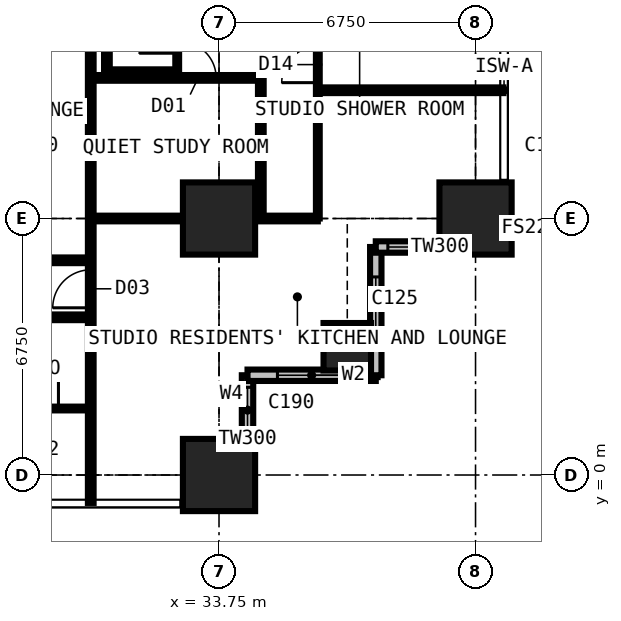
"""IFC4 building model, lengths in metres.
Left out: names, types, materials, properties, quantities, classifications, styles, units other than length and angle.
Written with IfcOpenShell. Run it as: python <this file> out.ifc"""

import sys

from ifc_helpers import new_model, si_unit, direction, frame, frame_2d, origin, origin_2d, place, context, subcontext, project, spatial, rectangle, extrude, element, fill, save


model = new_model("IFC4")
c1 = context("Model", 3, precision=1e-05, world=origin(), true_north=direction((0.0, 1.0)))
c2 = subcontext(c1, "Body", "Model", "MODEL_VIEW")
j1 = project(units=[si_unit("LENGTHUNIT", "METRE"), si_unit("PLANEANGLEUNIT", "RADIAN")], contexts=[c1])
p1 = place(None, origin())
s1 = spatial("IfcSite", under=j1, at=p1, CompositionType="ELEMENT")
p2 = place(p1, origin())
s2 = spatial("IfcBuilding", under=s1, at=p2, CompositionType="ELEMENT")
p3 = place(p2, frame((0.0, 0.0, 25.2)))
s3 = spatial("IfcBuildingStorey", under=s2, at=p3, CompositionType="ELEMENT", Elevation=25.2)
for number, where, z_axis, x_axis in (
    (1, (33.75, 0.0, 0.0), (0.0, 0.0, 1.0), (1.0, 0.0, 0.0)),
    (2, (33.75, 6.75, 0.0), (0.0, 0.0, 1.0), (1.0, 0.0, 0.0)),
):
    element("IfcColumn", number, at=place(p3, frame(where, z_axis=z_axis, x_axis=x_axis)), inside=s3, PredefinedType="COLUMN", context=c2, shape_type="SweptSolid", body=[
        extrude(rectangle(XDim=1.9, YDim=1.9, at=origin_2d()), origin(), (0.0, 0.0, 1.0), 3.6),
    ])
p4 = place(p3, frame((37.125, 3.375, 0.0), z_axis=(0.0, 0.0, 1.0), x_axis=(1.0, 0.0, 0.0)))
e3 = element("IfcColumn", 3, at=p4, inside=s3, PredefinedType="COLUMN", context=c2, shape_type="SweptSolid", body=[
    extrude(rectangle(XDim=1.25, YDim=1.25, at=origin_2d()), origin(), (0.0, 0.0, 1.0), 3.6),
])
p5 = place(p3, frame((40.5, 6.75, 0.0), z_axis=(0.0, 0.0, 1.0), x_axis=(1.0, 0.0, 0.0)))
e4 = element("IfcColumn", 4, at=p5, inside=s3, PredefinedType="COLUMN", context=c2, shape_type="SweptSolid", body=[
    extrude(rectangle(XDim=1.9, YDim=1.9, at=origin_2d()), origin(), (0.0, 0.0, 1.0), 3.6),
])
p6 = place(p3, frame((34.5, -0.75, 0.0), z_axis=(0.0, 0.0, 1.0), x_axis=(0.0, 1.0, 0.0)))
e5 = element("IfcWall", 5, at=p6, inside=s3, PredefinedType="SOLIDWALL", context=c2, shape_type="SweptSolid", body=[
    extrude(rectangle(XDim=3.375, YDim=0.3, at=frame_2d((1.688, 0.0))), origin(), (0.0, 0.0, 1.0), 3.375),
])
p7 = place(p6, frame((1.857, 0.0, 0.9)))
e6 = element("IfcOpeningElement", 6, at=p7, cuts=e5, PredefinedType="OPENING", context=c2, shape_type="SweptSolid", body=[
    extrude(rectangle(XDim=1.2, YDim=1.8, at=frame_2d((0.6, 0.9))), frame((0.0, 0.16, 0.0), z_axis=(0.0, -1.0, 0.0), x_axis=(1.0, 0.0, 0.0)), (0.0, 0.0, 1.0), 0.32),
])
p8 = place(p3, frame((34.5, 2.625, 0.0), z_axis=(0.0, 0.0, 1.0), x_axis=(1.0, 0.0, 0.0)))
e7 = element("IfcWall", 7, at=p8, inside=s3, PredefinedType="SOLIDWALL", context=c2, shape_type="SweptSolid", body=[
    extrude(rectangle(XDim=3.375, YDim=0.3, at=frame_2d((1.688, 0.0))), origin(), (0.0, 0.0, 1.0), 3.375),
])
p9 = place(p8, frame((0.788, 0.0, 0.6)))
e8 = element("IfcOpeningElement", 8, at=p9, cuts=e7, PredefinedType="OPENING", context=c2, shape_type="SweptSolid", body=[
    extrude(rectangle(XDim=1.8, YDim=2.1, at=frame_2d((0.9, 1.05))), frame((0.0, 0.16, 0.0), z_axis=(0.0, -1.0, 0.0), x_axis=(1.0, 0.0, 0.0)), (0.0, 0.0, 1.0), 0.32),
])
p10 = place(p3, frame((37.875, 2.625, 0.0), z_axis=(0.0, 0.0, 1.0), x_axis=(0.0, 1.0, 0.0)))
e9 = element("IfcWall", 9, at=p10, inside=s3, PredefinedType="SOLIDWALL", context=c2, shape_type="SweptSolid", body=[
    extrude(rectangle(XDim=3.375, YDim=0.3, at=frame_2d((1.688, 0.0))), origin(), (0.0, 0.0, 1.0), 3.375),
])
p11 = place(p10, frame((0.788, 0.0, 0.6)))
e10 = element("IfcOpeningElement", 10, at=p11, cuts=e9, PredefinedType="OPENING", context=c2, shape_type="SweptSolid", body=[
    extrude(rectangle(XDim=1.8, YDim=2.1, at=frame_2d((0.9, 1.05))), frame((0.0, 0.16, 0.0), z_axis=(0.0, -1.0, 0.0), x_axis=(1.0, 0.0, 0.0)), (0.0, 0.0, 1.0), 0.32),
])
p12 = place(p3, frame((37.875, 6.0, 0.0), z_axis=(0.0, 0.0, 1.0), x_axis=(1.0, 0.0, 0.0)))
e11 = element("IfcWall", 11, at=p12, inside=s3, PredefinedType="SOLIDWALL", context=c2, shape_type="SweptSolid", body=[
    extrude(rectangle(XDim=3.375, YDim=0.3, at=frame_2d((1.688, 0.0))), origin(), (0.0, 0.0, 1.0), 3.375),
])
p13 = place(p12, frame((0.317, 0.0, 0.9)))
e12 = element("IfcOpeningElement", 12, at=p13, cuts=e11, PredefinedType="OPENING", context=c2, shape_type="SweptSolid", body=[
    extrude(rectangle(XDim=1.2, YDim=1.8, at=frame_2d((0.6, 0.9))), frame((0.0, 0.16, 0.0), z_axis=(0.0, -1.0, 0.0), x_axis=(1.0, 0.0, 0.0)), (0.0, 0.0, 1.0), 0.32),
])
p14 = place(p3, frame((6.75, 4.15, 0.0), z_axis=(0.0, 0.0, 1.0), x_axis=(1.0, 0.0, 0.0)))
e13 = element("IfcWall", 13, at=p14, inside=s3, PredefinedType="PARTITIONING", context=c2, shape_type="SweptSolid", body=[
    extrude(rectangle(XDim=23.625, YDim=0.15, at=frame_2d((11.812, 0.0))), origin(), (0.0, 0.0, 1.0), 3.375),
])
p15 = place(p14, frame((0.2, 0.0, 0.0)))
e14 = element("IfcOpeningElement", 14, at=p15, cuts=e13, PredefinedType="OPENING", context=c2, shape_type="SweptSolid", body=[
    extrude(rectangle(XDim=0.95, YDim=2.2, at=frame_2d((0.475, 1.1))), frame((0.0, 0.085, 0.0), z_axis=(0.0, -1.0, 0.0), x_axis=(1.0, 0.0, 0.0)), (0.0, 0.0, 1.0), 0.17),
])
p16 = place(p14, frame((3.625, 0.0, 0.0)))
e15 = element("IfcOpeningElement", 15, at=p16, cuts=e13, PredefinedType="OPENING", context=c2, shape_type="SweptSolid", body=[
    extrude(rectangle(XDim=0.95, YDim=2.2, at=frame_2d((0.475, 1.1))), frame((0.0, 0.085, 0.0), z_axis=(0.0, -1.0, 0.0), x_axis=(1.0, 0.0, 0.0)), (0.0, 0.0, 1.0), 0.17),
])
p17 = place(p14, frame((18.475, 0.0, 0.0)))
e16 = element("IfcOpeningElement", 16, at=p17, cuts=e13, PredefinedType="OPENING", context=c2, shape_type="SweptSolid", body=[
    extrude(rectangle(XDim=0.95, YDim=2.2, at=frame_2d((0.475, 1.1))), frame((0.0, 0.085, 0.0), z_axis=(0.0, -1.0, 0.0), x_axis=(1.0, 0.0, 0.0)), (0.0, 0.0, 1.0), 0.17),
])
p18 = place(p14, frame((11.725, 0.0, 0.0)))
e17 = element("IfcOpeningElement", 17, at=p18, cuts=e13, PredefinedType="OPENING", context=c2, shape_type="SweptSolid", body=[
    extrude(rectangle(XDim=0.95, YDim=2.2, at=frame_2d((0.475, 1.1))), frame((0.0, 0.085, 0.0), z_axis=(0.0, -1.0, 0.0), x_axis=(1.0, 0.0, 0.0)), (0.0, 0.0, 1.0), 0.17),
])
p19 = place(p14, frame((6.95, 0.0, 0.0)))
e18 = element("IfcOpeningElement", 18, at=p19, cuts=e13, PredefinedType="OPENING", context=c2, shape_type="SweptSolid", body=[
    extrude(rectangle(XDim=0.95, YDim=2.2, at=frame_2d((0.475, 1.1))), frame((0.0, 0.085, 0.0), z_axis=(0.0, -1.0, 0.0), x_axis=(1.0, 0.0, 0.0)), (0.0, 0.0, 1.0), 0.17),
])
p20 = place(p3, frame((22.988, 5.65, 0.0), z_axis=(0.0, 0.0, 1.0), x_axis=(1.0, 0.0, 0.0)))
e19 = element("IfcWall", 19, at=p20, inside=s3, PredefinedType="PARTITIONING", context=c2, shape_type="SweptSolid", body=[
    extrude(rectangle(XDim=7.387, YDim=0.15, at=frame_2d((3.694, 0.0))), origin(), (0.0, 0.0, 1.0), 3.375),
])
p21 = place(p20, frame((2.1, 0.0, 0.0)))
e20 = element("IfcOpeningElement", 20, at=p21, cuts=e19, PredefinedType="OPENING", context=c2, shape_type="SweptSolid", body=[
    extrude(rectangle(XDim=0.95, YDim=2.2, at=frame_2d((0.475, 1.1))), frame((0.0, 0.085, 0.0), z_axis=(0.0, -1.0, 0.0), x_axis=(1.0, 0.0, 0.0)), (0.0, 0.0, 1.0), 0.17),
])
p22 = place(p3, frame((27.775, 1.75, 0.0), z_axis=(0.0, 0.0, 1.0), x_axis=(1.0, 0.0, 0.0)))
e21 = element("IfcWall", 21, at=p22, inside=s3, PredefinedType="PARTITIONING", context=c2, shape_type="SweptSolid", body=[
    extrude(rectangle(XDim=2.6, YDim=0.1, at=frame_2d((1.3, 0.0))), origin(), (0.0, 0.0, 1.0), 3.375),
])
p23 = place(p22, frame((0.85, 0.0, 0.0)))
e22 = element("IfcOpeningElement", 22, at=p23, cuts=e21, PredefinedType="OPENING", context=c2, shape_type="SweptSolid", body=[
    extrude(rectangle(XDim=0.9, YDim=2.2, at=frame_2d((0.45, 1.1))), frame((0.0, 0.06, 0.0), z_axis=(0.0, -1.0, 0.0), x_axis=(1.0, 0.0, 0.0)), (0.0, 0.0, 1.0), 0.12),
])
p24 = place(p3, frame((30.375, -0.734, 0.0), z_axis=(0.0, 0.0, 1.0), x_axis=(0.0, 1.0, 0.0)))
e23 = element("IfcWall", 23, at=p24, inside=s3, PredefinedType="PARTITIONING", context=c2, shape_type="SweptSolid", body=[
    extrude(rectangle(XDim=12.034, YDim=0.15, at=frame_2d((6.017, 0.0))), origin(), (0.0, 0.0, 1.0), 3.375),
])
p25 = place(p24, frame((5.134, 0.0, 0.0)))
e24 = element("IfcOpeningElement", 24, at=p25, cuts=e23, PredefinedType="OPENING", context=c2, shape_type="SweptSolid", body=[
    extrude(rectangle(XDim=1.0, YDim=2.2, at=frame_2d((0.5, 1.1))), frame((0.0, 0.085, 0.0), z_axis=(0.0, -1.0, 0.0), x_axis=(1.0, 0.0, 0.0)), (0.0, 0.0, 1.0), 0.17),
])
p26 = place(p3, frame((30.375, 6.75, 0.0), z_axis=(0.0, 0.0, 1.0), x_axis=(1.0, 0.0, 0.0)))
e25 = element("IfcWall", 25, at=p26, inside=s3, PredefinedType="PARTITIONING", context=c2, shape_type="SweptSolid", body=[
    extrude(rectangle(XDim=5.975, YDim=0.15, at=frame_2d((2.988, 0.0))), origin(), (0.0, 0.0, 1.0), 2.877),
])
p27 = place(p3, frame((30.375, 10.45, 0.0), z_axis=(0.0, 0.0, 1.0), x_axis=(1.0, 0.0, 0.0)))
e26 = element("IfcWall", 26, at=p27, inside=s3, PredefinedType="PARTITIONING", context=c2, shape_type="SweptSolid", body=[
    extrude(rectangle(XDim=4.475, YDim=0.15, at=frame_2d((2.238, 0.0))), origin(), (0.0, 0.0, 1.0), 3.375),
])
p28 = place(p27, frame((2.35, 0.0, 0.0)))
e27 = element("IfcOpeningElement", 27, at=p28, cuts=e26, PredefinedType="OPENING", context=c2, shape_type="SweptSolid", body=[
    extrude(rectangle(XDim=0.95, YDim=2.2, at=frame_2d((0.475, 1.1))), frame((0.0, 0.085, 0.0), z_axis=(0.0, -1.0, 0.0), x_axis=(1.0, 0.0, 0.0)), (0.0, 0.0, 1.0), 0.17),
])
p29 = place(p3, frame((30.8, 10.6, 0.0), z_axis=(0.0, 0.0, 1.0), x_axis=(0.0, 1.0, 0.0)))
e28 = element("IfcWall", 28, at=p29, inside=s3, PredefinedType="PARTITIONING", context=c2, shape_type="SweptSolid", body=[
    extrude(rectangle(XDim=0.7, YDim=0.15, at=frame_2d((0.35, 0.0))), origin(), (0.0, 0.0, 1.0), 3.375),
])
p30 = place(p3, frame((30.8, 10.6, 0.0), z_axis=(0.0, 0.0, 1.0), x_axis=(1.0, 0.0, 0.0)))
e29 = element("IfcWall", 29, at=p30, inside=s3, PredefinedType="PARTITIONING", context=c2, shape_type="SweptSolid", body=[
    extrude(rectangle(XDim=1.85, YDim=0.15, at=frame_2d((0.925, 0.0))), origin(), (0.0, 0.0, 1.0), 3.375),
])
p31 = place(p3, frame((32.65, 10.6, 0.0), z_axis=(0.0, 0.0, 1.0), x_axis=(0.0, 1.0, 0.0)))
e30 = element("IfcWall", 30, at=p31, inside=s3, PredefinedType="SHEAR", context=c2, shape_type="SweptSolid", body=[
    extrude(rectangle(XDim=9.3, YDim=0.1, at=frame_2d((4.65, 0.0))), origin(), (0.0, 0.0, 1.0), 3.375),
])
p32 = place(p31, frame((0.5, 0.0, 0.0)))
e31 = element("IfcOpeningElement", 31, at=p32, cuts=e30, PredefinedType="OPENING", context=c2, shape_type="SweptSolid", body=[
    extrude(rectangle(XDim=1.0, YDim=2.2, at=frame_2d((0.5, 1.1))), frame((0.0, 0.06, 0.0), z_axis=(0.0, -1.0, 0.0), x_axis=(1.0, 0.0, 0.0)), (0.0, 0.0, 1.0), 0.12),
])
p33 = place(p3, frame((34.85, 6.75, 0.0), z_axis=(0.0, 0.0, 1.0), x_axis=(0.0, 1.0, 0.0)))
e32 = element("IfcWall", 32, at=p33, inside=s3, PredefinedType="PARTITIONING", context=c2, shape_type="SweptSolid", body=[
    extrude(rectangle(XDim=3.7, YDim=0.15, at=frame_2d((1.85, 0.0))), origin(), (0.0, 0.0, 1.0), 3.375),
])
p34 = place(p3, frame((36.35, 6.75, 0.0), z_axis=(0.0, 0.0, 1.0), x_axis=(0.0, 1.0, 0.0)))
e33 = element("IfcWall", 33, at=p34, inside=s3, PredefinedType="PARTITIONING", context=c2, shape_type="SweptSolid", body=[
    extrude(rectangle(XDim=23.625, YDim=0.1, at=frame_2d((11.812, 0.0))), origin(), (0.0, 0.0, 1.0), 3.375),
])
p35 = place(p34, frame((3.575, 0.0, 0.0)))
e34 = element("IfcOpeningElement", 34, at=p35, cuts=e33, PredefinedType="OPENING", context=c2, shape_type="SweptSolid", body=[
    extrude(rectangle(XDim=0.95, YDim=2.2, at=frame_2d((0.475, 1.1))), frame((0.0, 0.06, 0.0), z_axis=(0.0, -1.0, 0.0), x_axis=(1.0, 0.0, 0.0)), (0.0, 0.0, 1.0), 0.12),
])
p36 = place(p34, frame((7.0, 0.0, 0.0)))
e35 = element("IfcOpeningElement", 35, at=p36, cuts=e33, PredefinedType="OPENING", context=c2, shape_type="SweptSolid", body=[
    extrude(rectangle(XDim=0.95, YDim=2.2, at=frame_2d((0.475, 1.1))), frame((0.0, 0.06, 0.0), z_axis=(0.0, -1.0, 0.0), x_axis=(1.0, 0.0, 0.0)), (0.0, 0.0, 1.0), 0.12),
])
p37 = place(p34, frame((10.375, 0.0, 0.0)))
e36 = element("IfcOpeningElement", 36, at=p37, cuts=e33, PredefinedType="OPENING", context=c2, shape_type="SweptSolid", body=[
    extrude(rectangle(XDim=0.95, YDim=2.2, at=frame_2d((0.475, 1.1))), frame((0.0, 0.06, 0.0), z_axis=(0.0, -1.0, 0.0), x_axis=(1.0, 0.0, 0.0)), (0.0, 0.0, 1.0), 0.12),
])
p38 = place(p34, frame((13.75, 0.0, 0.0)))
e37 = element("IfcOpeningElement", 37, at=p38, cuts=e33, PredefinedType="OPENING", context=c2, shape_type="SweptSolid", body=[
    extrude(rectangle(XDim=0.95, YDim=2.2, at=frame_2d((0.475, 1.1))), frame((0.0, 0.06, 0.0), z_axis=(0.0, -1.0, 0.0), x_axis=(1.0, 0.0, 0.0)), (0.0, 0.0, 1.0), 0.12),
])
p39 = place(p34, frame((17.125, 0.0, 0.0)))
e38 = element("IfcOpeningElement", 38, at=p39, cuts=e33, PredefinedType="OPENING", context=c2, shape_type="SweptSolid", body=[
    extrude(rectangle(XDim=0.95, YDim=2.2, at=frame_2d((0.475, 1.1))), frame((0.0, 0.06, 0.0), z_axis=(0.0, -1.0, 0.0), x_axis=(1.0, 0.0, 0.0)), (0.0, 0.0, 1.0), 0.12),
])
p40 = place(p34, frame((20.5, 0.0, 0.0)))
e39 = element("IfcOpeningElement", 39, at=p40, cuts=e33, PredefinedType="OPENING", context=c2, shape_type="SweptSolid", body=[
    extrude(rectangle(XDim=0.95, YDim=2.2, at=frame_2d((0.475, 1.1))), frame((0.0, 0.06, 0.0), z_axis=(0.0, -1.0, 0.0), x_axis=(1.0, 0.0, 0.0)), (0.0, 0.0, 1.0), 0.12),
])
p41 = place(p3, frame((36.35, 10.125, 0.0), z_axis=(0.0, 0.0, 1.0), x_axis=(1.0, 0.0, 0.0)))
e40 = element("IfcWall", 40, at=p41, inside=s3, PredefinedType="PARTITIONING", context=c2, shape_type="SweptSolid", body=[
    extrude(rectangle(XDim=4.884, YDim=0.15, at=frame_2d((2.442, 0.0))), origin(), (0.0, 0.0, 1.0), 3.375),
])
p42 = place(p7, origin())
e41 = element("IfcWindow", 41, at=p42, inside=s3, PartitioningType="SINGLE_PANEL", PredefinedType="WINDOW", context=c2, shape_type="SweptSolid", body=[
    extrude(rectangle(XDim=1.2, YDim=1.8, at=frame_2d((0.6, 0.9))), frame((0.0, 0.03, 0.0), z_axis=(0.0, -1.0, 0.0), x_axis=(1.0, 0.0, 0.0)), (0.0, 0.0, 1.0), 0.06),
])
fill(e6, e41)
p43 = place(p9, origin())
e42 = element("IfcWindow", 42, at=p43, inside=s3, PartitioningType="SINGLE_PANEL", PredefinedType="WINDOW", context=c2, shape_type="SweptSolid", body=[
    extrude(rectangle(XDim=1.8, YDim=2.1, at=frame_2d((0.9, 1.05))), frame((0.0, 0.03, 0.0), z_axis=(0.0, -1.0, 0.0), x_axis=(1.0, 0.0, 0.0)), (0.0, 0.0, 1.0), 0.06),
])
fill(e8, e42)
p44 = place(p11, origin())
e43 = element("IfcWindow", 43, at=p44, inside=s3, PartitioningType="SINGLE_PANEL", PredefinedType="WINDOW", context=c2, shape_type="SweptSolid", body=[
    extrude(rectangle(XDim=1.8, YDim=2.1, at=frame_2d((0.9, 1.05))), frame((0.0, 0.03, 0.0), z_axis=(0.0, -1.0, 0.0), x_axis=(1.0, 0.0, 0.0)), (0.0, 0.0, 1.0), 0.06),
])
fill(e10, e43)
p45 = place(p13, origin())
e44 = element("IfcWindow", 44, at=p45, inside=s3, PartitioningType="SINGLE_PANEL", PredefinedType="WINDOW", context=c2, shape_type="SweptSolid", body=[
    extrude(rectangle(XDim=1.2, YDim=1.8, at=frame_2d((0.6, 0.9))), frame((0.0, 0.03, 0.0), z_axis=(0.0, -1.0, 0.0), x_axis=(1.0, 0.0, 0.0)), (0.0, 0.0, 1.0), 0.06),
])
fill(e12, e44)
p46 = place(p23, origin())
e45 = element("IfcDoor", 45, at=p46, inside=s3, OperationType="SINGLE_SWING_RIGHT", PredefinedType="DOOR", context=c2, shape_type="SweptSolid", body=[
    extrude(rectangle(XDim=0.9, YDim=2.2, at=frame_2d((0.45, 1.1))), frame((0.0, 0.025, 0.0), z_axis=(0.0, -1.0, 0.0), x_axis=(1.0, 0.0, 0.0)), (0.0, 0.0, 1.0), 0.05),
])
fill(e22, e45)
p47 = place(p25, origin())
e46 = element("IfcDoor", 46, at=p47, inside=s3, OperationType="SINGLE_SWING_LEFT", PredefinedType="DOOR", context=c2, shape_type="SweptSolid", body=[
    extrude(rectangle(XDim=1.0, YDim=2.2, at=frame_2d((0.5, 1.1))), frame((0.0, 0.025, 0.0), z_axis=(0.0, -1.0, 0.0), x_axis=(1.0, 0.0, 0.0)), (0.0, 0.0, 1.0), 0.05),
])
fill(e24, e46)
p48 = place(p35, origin())
e47 = element("IfcDoor", 47, at=p48, inside=s3, OperationType="SINGLE_SWING_LEFT", PredefinedType="DOOR", context=c2, shape_type="SweptSolid", body=[
    extrude(rectangle(XDim=0.95, YDim=2.2, at=frame_2d((0.475, 1.1))), frame((0.0, 0.025, 0.0), z_axis=(0.0, -1.0, 0.0), x_axis=(1.0, 0.0, 0.0)), (0.0, 0.0, 1.0), 0.05),
])
fill(e34, e47)
p49 = place(p32, origin())
e48 = element("IfcDoor", 48, at=p49, inside=s3, OperationType="SINGLE_SWING_LEFT", PredefinedType="DOOR", context=c2, shape_type="SweptSolid", body=[
    extrude(rectangle(XDim=1.0, YDim=2.2, at=frame_2d((0.5, 1.1))), frame((0.0, 0.025, 0.0), z_axis=(0.0, -1.0, 0.0), x_axis=(1.0, 0.0, 0.0)), (0.0, 0.0, 1.0), 0.05),
])
fill(e31, e48)
p50 = place(p28, origin())
e49 = element("IfcDoor", 49, at=p50, inside=s3, OperationType="SINGLE_SWING_LEFT", PredefinedType="DOOR", context=c2, shape_type="SweptSolid", body=[
    extrude(rectangle(XDim=0.95, YDim=2.2, at=frame_2d((0.475, 1.1))), frame((0.0, 0.025, 0.0), z_axis=(0.0, -1.0, 0.0), x_axis=(1.0, 0.0, 0.0)), (0.0, 0.0, 1.0), 0.05),
])
fill(e27, e49)
save(model, sys.argv[1])
